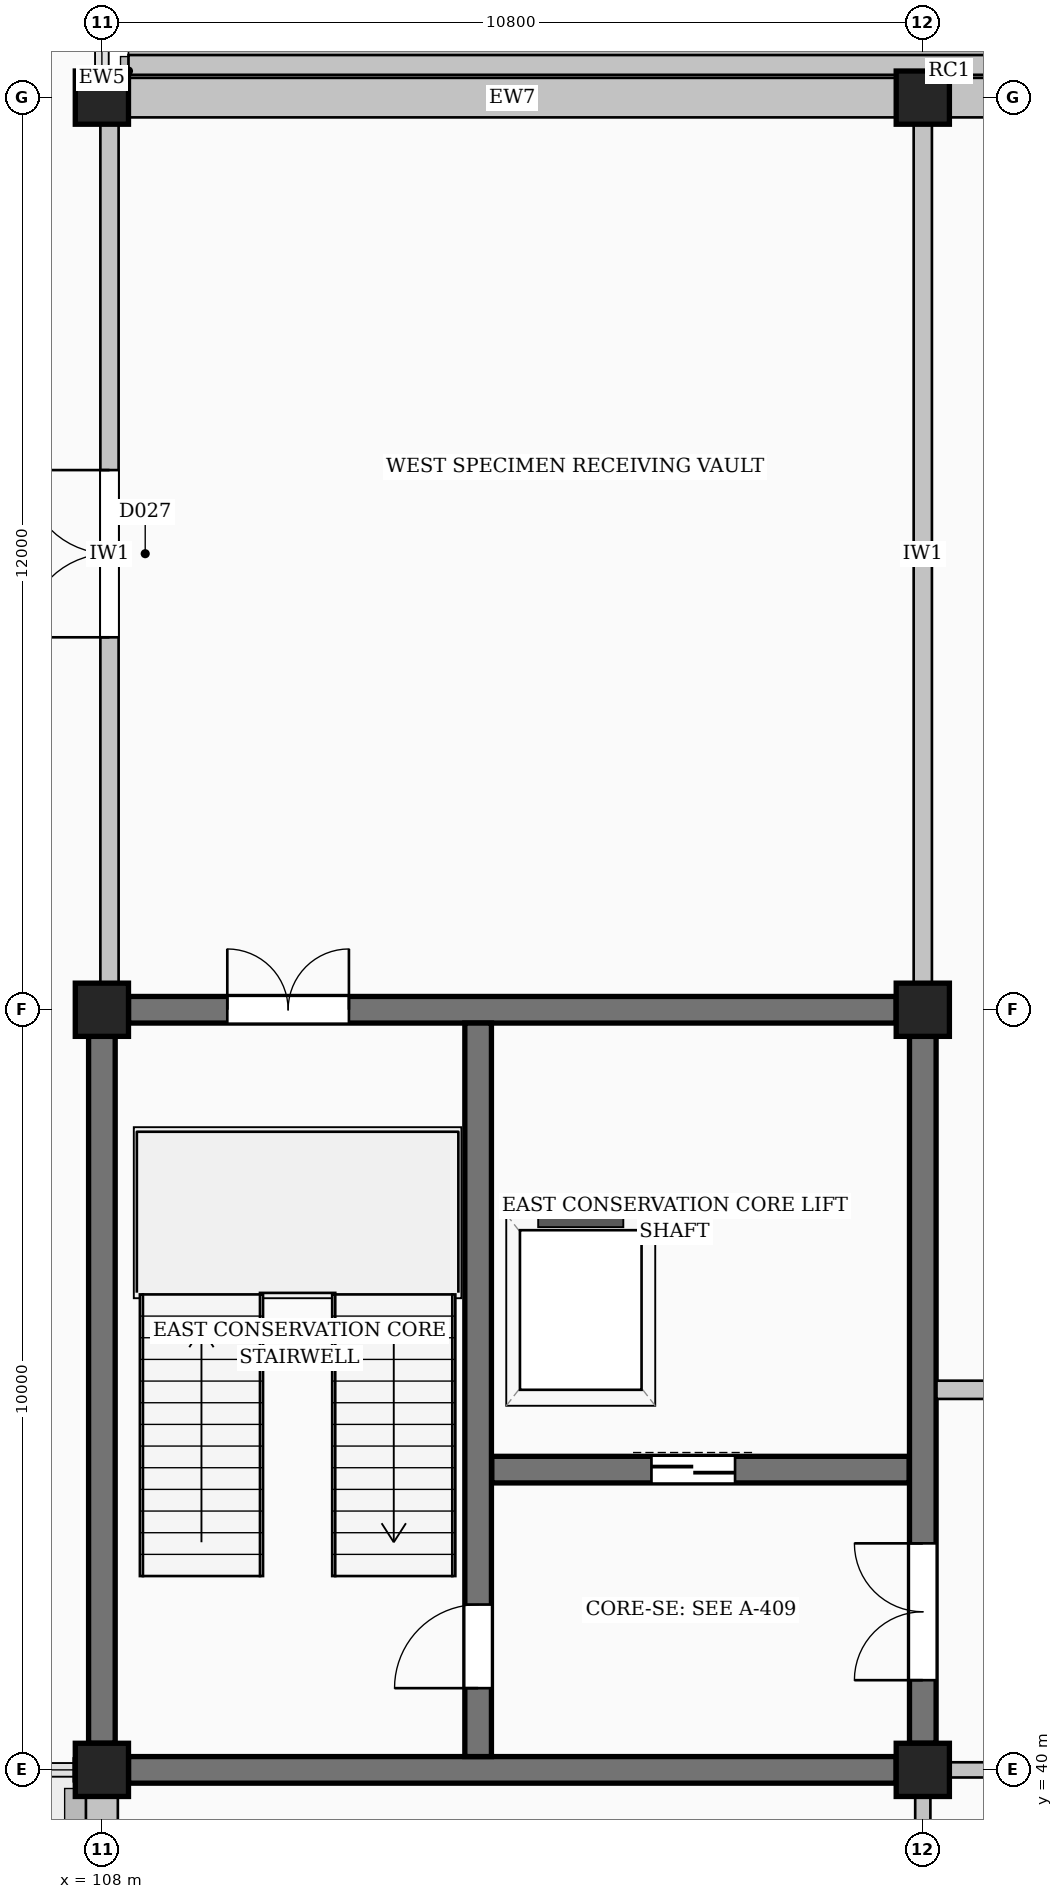
"""IFC4 building model, lengths in metres.
Left out: names, types, materials, properties, quantities, classifications, styles, units other than length and angle.
Written with IfcOpenShell. Run it as: python <this file> out.ifc"""

import sys

from ifc_helpers import new_model, si_unit, direction, frame, frame_2d, origin, origin_2d, place, context, subcontext, project, spatial, rectangle, extrude, element, fill, save


model = new_model("IFC4")
c1 = context("Model", 3, precision=1e-05, world=origin(), true_north=direction((0.0, 1.0)))
c2 = subcontext(c1, "Body", "Model", "MODEL_VIEW")
j1 = project(units=[si_unit("LENGTHUNIT", "METRE"), si_unit("PLANEANGLEUNIT", "RADIAN")], contexts=[c1])
p1 = place(None, origin())
s1 = spatial("IfcSite", under=j1, at=p1, CompositionType="ELEMENT")
p2 = place(p1, origin())
s2 = spatial("IfcBuilding", under=s1, at=p2, CompositionType="ELEMENT")
p3 = place(p2, origin())
s3 = spatial("IfcBuildingStorey", under=s2, at=p3, CompositionType="ELEMENT", Elevation=0.0)
for number, where, z_axis, x_axis in (
    (1, (108.0, 40.0, 0.0), (0.0, 0.0, 1.0), (1.0, 0.0, 0.0)),
    (2, (108.0, 50.0, 0.0), (0.0, 0.0, 1.0), (1.0, 0.0, 0.0)),
    (3, (108.0, 62.0, 0.0), (0.0, 0.0, 1.0), (1.0, 0.0, 0.0)),
    (4, (118.8, 40.0, 0.0), (0.0, 0.0, 1.0), (1.0, 0.0, 0.0)),
    (5, (118.8, 50.0, 0.0), (0.0, 0.0, 1.0), (1.0, 0.0, 0.0)),
    (6, (118.8, 62.0, 0.0), (0.0, 0.0, 1.0), (1.0, 0.0, 0.0)),
):
    element("IfcColumn", number, at=place(p3, frame(where, z_axis=z_axis, x_axis=x_axis)), inside=s3, PredefinedType="COLUMN", context=c2, shape_type="SweptSolid", body=[
        extrude(rectangle(XDim=0.7, YDim=0.7, at=origin_2d()), origin(), (0.0, 0.0, 1.0), 4.8),
    ])
p4 = place(p3, frame((108.35, 62.43, -1.38), z_axis=(0.0, 0.0, 1.0), x_axis=(1.0, 0.0, 0.0)))
e7 = element("IfcWall", 7, at=p4, inside=s3, PredefinedType="PARAPET", context=c2, shape_type="SweptSolid", body=[
    extrude(rectangle(XDim=53.2, YDim=0.26, at=frame_2d((26.6, 0.0))), origin(), (0.0, 0.0, 1.0), 4.58),
])
p5 = place(p3, frame((107.63, 40.0, 0.0), z_axis=(0.0, 0.0, 1.0), x_axis=(1.0, 0.0, 0.0)))
e8 = element("IfcWall", 8, at=p5, inside=s3, PredefinedType="STANDARD", context=c2, shape_type="SweptSolid", body=[
    extrude(rectangle(XDim=0.225, YDim=0.3, at=frame_2d((0.113, 0.0))), origin(), (0.0, 0.0, 1.0), 4.56),
])
p6 = place(p3, frame((108.0, 39.855, 0.0), z_axis=(0.0, 0.0, 1.0), x_axis=(0.0, -1.0, 0.0)))
e9 = element("IfcWall", 9, at=p6, inside=s3, PredefinedType="STANDARD", context=c2, shape_type="SweptSolid", body=[
    extrude(rectangle(XDim=9.71, YDim=0.42, at=frame_2d((4.855, 0.0))), origin(), (0.0, 0.0, 1.0), 3.97),
])
p7 = place(p6, frame((4.055, 0.0, 1.2)))
e10 = element("IfcOpeningElement", 10, at=p7, cuts=e9, PredefinedType="OPENING", context=c2, shape_type="SweptSolid", body=[
    extrude(rectangle(XDim=1.6, YDim=1.8, at=frame_2d((0.8, 0.9))), frame((0.0, 0.22, 0.0), z_axis=(0.0, -1.0, 0.0), x_axis=(1.0, 0.0, 0.0)), (0.0, 0.0, 1.0), 0.44),
])
for number, where, z_axis, x_axis in (
    (11, (129.455, 62.0, 0.0), (0.0, 0.0, 1.0), (-1.0, 0.0, 0.0)),
    (12, (118.655, 62.0, 0.0), (0.0, 0.0, 1.0), (-1.0, 0.0, 0.0)),
):
    element("IfcWall", number, at=place(p3, frame(where, z_axis=z_axis, x_axis=x_axis)), inside=s3, PredefinedType="SOLIDWALL", context=c2, shape_type="SweptSolid", body=[
        extrude(rectangle(XDim=10.51, YDim=0.52, at=frame_2d((5.255, 0.0))), origin(), (0.0, 0.0, 1.0), 3.819),
    ])
p8 = place(p3, frame((108.0, 62.145, 0.0), z_axis=(0.0, 0.0, 1.0), x_axis=(0.0, 1.0, 0.0)))
e13 = element("IfcWall", 13, at=p8, inside=s3, PredefinedType="STANDARD", context=c2, shape_type="SweptSolid", body=[
    extrude(rectangle(XDim=0.225, YDim=0.3, at=frame_2d((0.113, 0.0))), origin(), (0.0, 0.0, 1.0), 4.56),
])
p9 = place(p3, frame((108.35, 40.0, 0.0), z_axis=(0.0, 0.0, 1.0), x_axis=(1.0, 0.0, 0.0)))
e14 = element("IfcWall", 14, at=p9, inside=s3, PredefinedType="SHEAR", context=c2, shape_type="SweptSolid", body=[
    extrude(rectangle(XDim=10.1, YDim=0.35, at=frame_2d((5.05, 0.0))), origin(), (0.0, 0.0, 1.0), 4.56),
])
p10 = place(p3, frame((108.35, 50.0, 0.0), z_axis=(0.0, 0.0, 1.0), x_axis=(1.0, 0.0, 0.0)))
e15 = element("IfcWall", 15, at=p10, inside=s3, PredefinedType="SHEAR", context=c2, shape_type="SweptSolid", body=[
    extrude(rectangle(XDim=10.1, YDim=0.35, at=frame_2d((5.05, 0.0))), origin(), (0.0, 0.0, 1.0), 4.56),
])
p11 = place(p10, frame((1.3, 0.0, 0.0)))
e16 = element("IfcOpeningElement", 16, at=p11, cuts=e15, PredefinedType="OPENING", context=c2, shape_type="SweptSolid", body=[
    extrude(rectangle(XDim=1.6, YDim=2.2, at=frame_2d((0.8, 1.1))), frame((0.0, 0.185, 0.0), z_axis=(0.0, -1.0, 0.0), x_axis=(1.0, 0.0, 0.0)), (0.0, 0.0, 1.0), 0.37),
])
p12 = place(p3, frame((108.0, 40.35, 0.0), z_axis=(0.0, 0.0, 1.0), x_axis=(0.0, 1.0, 0.0)))
e17 = element("IfcWall", 17, at=p12, inside=s3, PredefinedType="SHEAR", context=c2, shape_type="SweptSolid", body=[
    extrude(rectangle(XDim=9.3, YDim=0.35, at=frame_2d((4.65, 0.0))), origin(), (0.0, 0.0, 1.0), 4.56),
])
p13 = place(p3, frame((118.8, 40.35, 0.0), z_axis=(0.0, 0.0, 1.0), x_axis=(0.0, 1.0, 0.0)))
e18 = element("IfcWall", 18, at=p13, inside=s3, PredefinedType="SHEAR", context=c2, shape_type="SweptSolid", body=[
    extrude(rectangle(XDim=9.3, YDim=0.35, at=frame_2d((4.65, 0.0))), origin(), (0.0, 0.0, 1.0), 4.56),
])
p14 = place(p13, frame((0.83, 0.0, 0.0)))
e19 = element("IfcOpeningElement", 19, at=p14, cuts=e18, PredefinedType="OPENING", context=c2, shape_type="SweptSolid", body=[
    extrude(rectangle(XDim=1.8, YDim=2.25, at=frame_2d((0.9, 1.125))), frame((0.0, 0.185, 0.0), z_axis=(0.0, -1.0, 0.0), x_axis=(1.0, 0.0, 0.0)), (0.0, 0.0, 1.0), 0.37),
])
p15 = place(p3, frame((112.95, 40.175, 0.0), z_axis=(0.0, 0.0, 1.0), x_axis=(0.0, 1.0, 0.0)))
e20 = element("IfcWall", 20, at=p15, inside=s3, PredefinedType="SHEAR", context=c2, shape_type="SweptSolid", body=[
    extrude(rectangle(XDim=9.65, YDim=0.35, at=frame_2d((4.825, 0.0))), origin(), (0.0, 0.0, 1.0), 4.56),
])
p16 = place(p15, frame((0.9, 0.0, 0.0)))
e21 = element("IfcOpeningElement", 21, at=p16, cuts=e20, PredefinedType="OPENING", context=c2, shape_type="SweptSolid", body=[
    extrude(rectangle(XDim=1.1, YDim=2.2, at=frame_2d((0.55, 1.1))), frame((0.0, 0.185, 0.0), z_axis=(0.0, -1.0, 0.0), x_axis=(1.0, 0.0, 0.0)), (0.0, 0.0, 1.0), 0.37),
])
p17 = place(p3, frame((113.13, 43.95, 0.0), z_axis=(0.0, 0.0, 1.0), x_axis=(1.0, 0.0, 0.0)))
e22 = element("IfcWall", 22, at=p17, inside=s3, PredefinedType="SHEAR", context=c2, shape_type="SweptSolid", body=[
    extrude(rectangle(XDim=5.49, YDim=0.35, at=frame_2d((2.745, 0.0))), origin(), (0.0, 0.0, 1.0), 4.56),
])
p18 = place(p17, frame((2.1, 0.0, 0.0)))
e23 = element("IfcOpeningElement", 23, at=p18, cuts=e22, PredefinedType="OPENING", context=c2, shape_type="SweptSolid", body=[
    extrude(rectangle(XDim=1.1, YDim=2.2, at=frame_2d((0.55, 1.1))), frame((0.0, 0.185, 0.0), z_axis=(0.0, -1.0, 0.0), x_axis=(1.0, 0.0, 0.0)), (0.0, 0.0, 1.0), 0.37),
])
p19 = place(p3, frame((118.98, 40.0, 0.0), z_axis=(0.0, 0.0, 1.0), x_axis=(1.0, 0.0, 0.0)))
e24 = element("IfcWall", 24, at=p19, inside=s3, PredefinedType="SOLIDWALL", context=c2, shape_type="SweptSolid", body=[
    extrude(rectangle(XDim=10.42, YDim=0.2, at=frame_2d((5.21, 0.0))), origin(), (0.0, 0.0, 1.0), 3.819),
])
p20 = place(p19, frame((4.41, 0.0, 0.0)))
e25 = element("IfcOpeningElement", 25, at=p20, cuts=e24, PredefinedType="OPENING", context=c2, shape_type="SweptSolid", body=[
    extrude(rectangle(XDim=1.6, YDim=2.3, at=frame_2d((0.8, 1.15))), frame((0.0, 0.11, 0.0), z_axis=(0.0, -1.0, 0.0), x_axis=(1.0, 0.0, 0.0)), (0.0, 0.0, 1.0), 0.22),
])
p21 = place(p3, frame((118.98, 45.0, 0.0), z_axis=(0.0, 0.0, 1.0), x_axis=(1.0, 0.0, 0.0)))
e26 = element("IfcWall", 26, at=p21, inside=s3, PredefinedType="SOLIDWALL", context=c2, shape_type="SweptSolid", body=[
    extrude(rectangle(XDim=42.84, YDim=0.24, at=frame_2d((21.42, 0.0))), origin(), (0.0, 0.0, 1.0), 4.52),
])
p22 = place(p21, frame((20.32, 0.0, 0.0)))
e27 = element("IfcOpeningElement", 27, at=p22, cuts=e26, PredefinedType="OPENING", context=c2, shape_type="SweptSolid", body=[
    extrude(rectangle(XDim=2.2, YDim=2.6, at=frame_2d((1.1, 1.3))), frame((0.0, 0.13, 0.0), z_axis=(0.0, -1.0, 0.0), x_axis=(1.0, 0.0, 0.0)), (0.0, 0.0, 1.0), 0.26),
])
p23 = place(p3, frame((108.1, 50.18, 0.0), z_axis=(0.0, 0.0, 1.0), x_axis=(0.0, 1.0, 0.0)))
e28 = element("IfcWall", 28, at=p23, inside=s3, PredefinedType="SOLIDWALL", context=c2, shape_type="SweptSolid", body=[
    extrude(rectangle(XDim=11.64, YDim=0.24, at=frame_2d((5.82, 0.0))), origin(), (0.0, 0.0, 1.0), 3.919),
])
p24 = place(p23, frame((4.72, 0.0, 0.0)))
e29 = element("IfcOpeningElement", 29, at=p24, cuts=e28, PredefinedType="OPENING", context=c2, shape_type="SweptSolid", body=[
    extrude(rectangle(XDim=2.2, YDim=2.6, at=frame_2d((1.1, 1.3))), frame((0.0, 0.13, 0.0), z_axis=(0.0, -1.0, 0.0), x_axis=(1.0, 0.0, 0.0)), (0.0, 0.0, 1.0), 0.26),
])
p25 = place(p3, frame((118.8, 30.2, 0.0), z_axis=(0.0, 0.0, 1.0), x_axis=(0.0, 1.0, 0.0)))
e30 = element("IfcWall", 30, at=p25, inside=s3, PredefinedType="SOLIDWALL", context=c2, shape_type="SweptSolid", body=[
    extrude(rectangle(XDim=9.62, YDim=0.2, at=frame_2d((4.81, 0.0))), origin(), (0.0, 0.0, 1.0), 3.97),
])
p26 = place(p3, frame((118.8, 50.18, 0.0), z_axis=(0.0, 0.0, 1.0), x_axis=(0.0, 1.0, 0.0)))
e31 = element("IfcWall", 31, at=p26, inside=s3, PredefinedType="SOLIDWALL", context=c2, shape_type="SweptSolid", body=[
    extrude(rectangle(XDim=11.64, YDim=0.24, at=frame_2d((5.82, 0.0))), origin(), (0.0, 0.0, 1.0), 3.919),
])
p27 = place(p16, origin())
e32 = element("IfcDoor", 32, at=p27, inside=s3, OperationType="SINGLE_SWING_LEFT", PredefinedType="DOOR", context=c2, shape_type="SweptSolid", body=[
    extrude(rectangle(XDim=1.1, YDim=2.2, at=frame_2d((0.55, 1.1))), frame((0.0, 0.025, 0.0), z_axis=(0.0, -1.0, 0.0), x_axis=(1.0, 0.0, 0.0)), (0.0, 0.0, 1.0), 0.05),
])
fill(e21, e32)
p28 = place(p14, origin())
e33 = element("IfcDoor", 33, at=p28, inside=s3, OperationType="DOUBLE_DOOR_SINGLE_SWING", PredefinedType="DOOR", context=c2, shape_type="SweptSolid", body=[
    extrude(rectangle(XDim=1.8, YDim=2.25, at=frame_2d((0.9, 1.125))), frame((0.0, 0.025, 0.0), z_axis=(0.0, -1.0, 0.0), x_axis=(1.0, 0.0, 0.0)), (0.0, 0.0, 1.0), 0.05),
])
fill(e19, e33)
p29 = place(p11, origin())
e34 = element("IfcDoor", 34, at=p29, inside=s3, OperationType="DOUBLE_DOOR_SINGLE_SWING", PredefinedType="DOOR", context=c2, shape_type="SweptSolid", body=[
    extrude(rectangle(XDim=1.6, YDim=2.2, at=frame_2d((0.8, 1.1))), frame((0.0, 0.025, 0.0), z_axis=(0.0, -1.0, 0.0), x_axis=(1.0, 0.0, 0.0)), (0.0, 0.0, 1.0), 0.05),
])
fill(e16, e34)
p30 = place(p18, origin())
e35 = element("IfcDoor", 35, at=p30, inside=s3, OperationType="DOUBLE_DOOR_SLIDING", PredefinedType="DOOR", context=c2, shape_type="SweptSolid", body=[
    extrude(rectangle(XDim=1.1, YDim=2.2, at=frame_2d((0.55, 1.1))), frame((0.0, 0.025, 0.0), z_axis=(0.0, -1.0, 0.0), x_axis=(1.0, 0.0, 0.0)), (0.0, 0.0, 1.0), 0.05),
])
fill(e23, e35)
p31 = place(p24, origin())
e36 = element("IfcDoor", 36, at=p31, inside=s3, OperationType="DOUBLE_DOOR_SINGLE_SWING", PredefinedType="DOOR", context=c2, shape_type="SweptSolid", body=[
    extrude(rectangle(XDim=2.2, YDim=2.6, at=frame_2d((1.1, 1.3))), frame((0.0, 0.025, 0.0), z_axis=(0.0, -1.0, 0.0), x_axis=(1.0, 0.0, 0.0)), (0.0, 0.0, 1.0), 0.05),
])
fill(e29, e36)
save(model, sys.argv[1])
